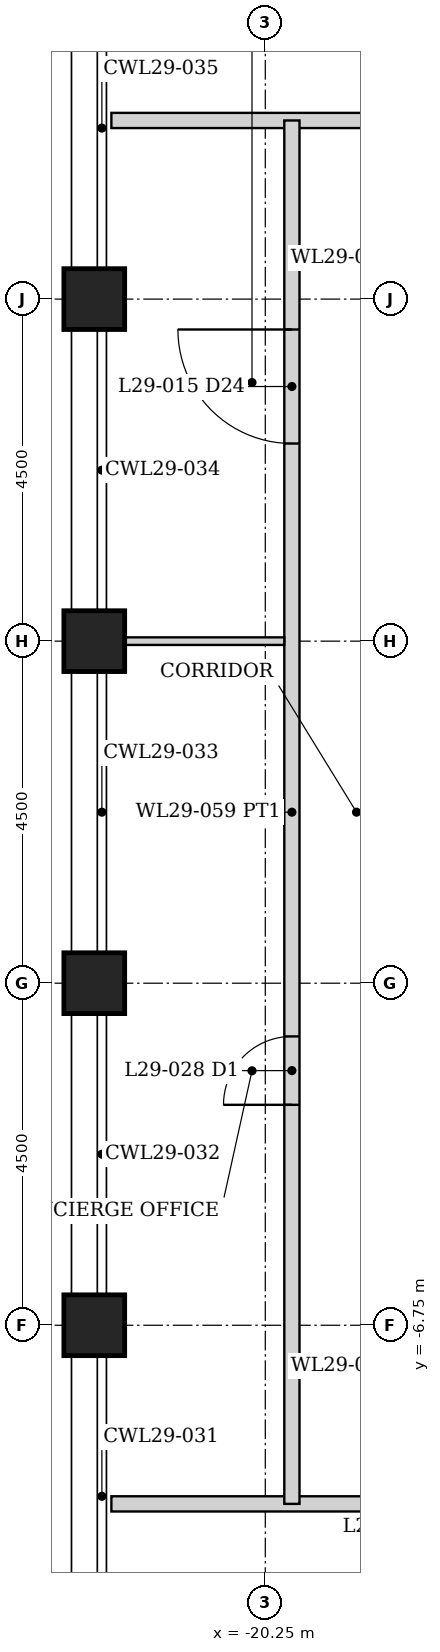
"""IFC4 building model, lengths in metres.
Left out: names, types, materials, properties, quantities, classifications, styles, units other than length and angle.
Written with IfcOpenShell. Run it as: python <this file> out.ifc"""

import sys

from ifc_helpers import new_model, si_unit, direction, frame, frame_2d, origin, origin_2d, place, context, subcontext, project, spatial, rectangle, hollow_rectangle, extrude, element, fill, save


model = new_model("IFC4")
c1 = context("Model", 3, precision=1e-05, world=origin(), true_north=direction((0.0, 1.0)))
c2 = subcontext(c1, "Body", "Model", "MODEL_VIEW")
j1 = project(units=[si_unit("LENGTHUNIT", "METRE"), si_unit("PLANEANGLEUNIT", "RADIAN")], contexts=[c1])
p1 = place(None, origin())
s1 = spatial("IfcSite", under=j1, at=p1, CompositionType="ELEMENT")
p2 = place(p1, origin())
s2 = spatial("IfcBuilding", under=s1, at=p2, CompositionType="ELEMENT")
p3 = place(p2, frame((0.0, 0.0, 112.4)))
s3 = spatial("IfcBuildingStorey", under=s2, at=p3, CompositionType="ELEMENT", Elevation=112.4)
for number, where, z_axis, x_axis in (
    (1, (-22.5, -6.75, 0.0), (0.0, 0.0, 1.0), (1.0, 0.0, 0.0)),
    (2, (-22.5, -2.25, 0.0), (0.0, 0.0, 1.0), (1.0, 0.0, 0.0)),
    (3, (-22.5, 2.25, 0.0), (0.0, 0.0, 1.0), (1.0, 0.0, 0.0)),
    (4, (-22.5, 6.75, 0.0), (0.0, 0.0, 1.0), (1.0, 0.0, 0.0)),
):
    element("IfcColumn", number, at=place(p3, frame(where, z_axis=z_axis, x_axis=x_axis)), inside=s3, PredefinedType="COLUMN", context=c2, shape_type="SweptSolid", body=[
        extrude(hollow_rectangle(XDim=0.8, YDim=0.8, WallThickness=0.06, at=origin_2d()), origin(), (0.0, 0.0, 1.0), 6.0),
    ])
p4 = place(p3, frame((-22.275, 9.1, 0.0), z_axis=(0.0, 0.0, 1.0), x_axis=(1.0, 0.0, 0.0)))
e5 = element("IfcWall", 5, at=p4, inside=s3, PredefinedType="PARTITIONING", context=c2, shape_type="SweptSolid", body=[
    extrude(rectangle(XDim=44.55, YDim=0.2, at=frame_2d((22.275, 0.0))), origin(), (0.0, 0.0, 1.0), 4.874),
])
p5 = place(p4, frame((4.065, 0.0, 0.0)))
e6 = element("IfcOpeningElement", 6, at=p5, cuts=e5, PredefinedType="OPENING", context=c2, shape_type="SweptSolid", body=[
    extrude(rectangle(XDim=0.9, YDim=2.1, at=frame_2d((0.45, 1.05))), frame((0.0, 0.11, 0.0), z_axis=(0.0, -1.0, 0.0), x_axis=(1.0, 0.0, 0.0)), (0.0, 0.0, 1.0), 0.22),
])
p6 = place(p4, frame((9.625, 0.0, 0.0)))
e7 = element("IfcOpeningElement", 7, at=p6, cuts=e5, PredefinedType="OPENING", context=c2, shape_type="SweptSolid", body=[
    extrude(rectangle(XDim=0.8, YDim=2.1, at=frame_2d((0.4, 1.05))), frame((0.0, 0.11, 0.0), z_axis=(0.0, -1.0, 0.0), x_axis=(1.0, 0.0, 0.0)), (0.0, 0.0, 1.0), 0.22),
])
p7 = place(p4, frame((12.8, 0.0, 0.0)))
e8 = element("IfcOpeningElement", 8, at=p7, cuts=e5, PredefinedType="OPENING", context=c2, shape_type="SweptSolid", body=[
    extrude(rectangle(XDim=1.2, YDim=2.1, at=frame_2d((0.6, 1.05))), frame((0.0, 0.11, 0.0), z_axis=(0.0, -1.0, 0.0), x_axis=(1.0, 0.0, 0.0)), (0.0, 0.0, 1.0), 0.22),
])
p8 = place(p4, frame((21.825, 0.0, 0.0)))
e9 = element("IfcOpeningElement", 9, at=p8, cuts=e5, PredefinedType="OPENING", context=c2, shape_type="SweptSolid", body=[
    extrude(rectangle(XDim=0.9, YDim=2.1, at=frame_2d((0.45, 1.05))), frame((0.0, 0.11, 0.0), z_axis=(0.0, -1.0, 0.0), x_axis=(1.0, 0.0, 0.0)), (0.0, 0.0, 1.0), 0.22),
])
p9 = place(p4, frame((16.9, 0.0, 0.0)))
e10 = element("IfcOpeningElement", 10, at=p9, cuts=e5, PredefinedType="OPENING", context=c2, shape_type="SweptSolid", body=[
    extrude(rectangle(XDim=1.0, YDim=2.1, at=frame_2d((0.5, 1.05))), frame((0.0, 0.11, 0.0), z_axis=(0.0, -1.0, 0.0), x_axis=(1.0, 0.0, 0.0)), (0.0, 0.0, 1.0), 0.22),
])
p10 = place(p4, frame((26.65, 0.0, 0.0)))
e11 = element("IfcOpeningElement", 11, at=p10, cuts=e5, PredefinedType="OPENING", context=c2, shape_type="SweptSolid", body=[
    extrude(rectangle(XDim=1.0, YDim=2.1, at=frame_2d((0.5, 1.05))), frame((0.0, 0.11, 0.0), z_axis=(0.0, -1.0, 0.0), x_axis=(1.0, 0.0, 0.0)), (0.0, 0.0, 1.0), 0.22),
])
p11 = place(p4, frame((40.436, 0.0, 0.0)))
e12 = element("IfcOpeningElement", 12, at=p11, cuts=e5, PredefinedType="OPENING", context=c2, shape_type="SweptSolid", body=[
    extrude(rectangle(XDim=0.9, YDim=2.1, at=frame_2d((0.45, 1.05))), frame((0.0, 0.11, 0.0), z_axis=(0.0, -1.0, 0.0), x_axis=(1.0, 0.0, 0.0)), (0.0, 0.0, 1.0), 0.22),
])
p12 = place(p4, frame((32.15, 0.0, 0.0)))
e13 = element("IfcOpeningElement", 13, at=p12, cuts=e5, PredefinedType="OPENING", context=c2, shape_type="SweptSolid", body=[
    extrude(rectangle(XDim=1.5, YDim=2.1, at=frame_2d((0.75, 1.05))), frame((0.0, 0.11, 0.0), z_axis=(0.0, -1.0, 0.0), x_axis=(1.0, 0.0, 0.0)), (0.0, 0.0, 1.0), 0.22),
])
p13 = place(p4, frame((37.775, 0.0, 0.0)))
e14 = element("IfcOpeningElement", 14, at=p13, cuts=e5, PredefinedType="OPENING", context=c2, shape_type="SweptSolid", body=[
    extrude(rectangle(XDim=1.0, YDim=2.1, at=frame_2d((0.5, 1.05))), frame((0.0, 0.11, 0.0), z_axis=(0.0, -1.0, 0.0), x_axis=(1.0, 0.0, 0.0)), (0.0, 0.0, 1.0), 0.22),
])
p14 = place(p3, frame((-22.275, -9.1, 0.0), z_axis=(0.0, 0.0, 1.0), x_axis=(1.0, 0.0, 0.0)))
e15 = element("IfcWall", 15, at=p14, inside=s3, PredefinedType="PARTITIONING", context=c2, shape_type="SweptSolid", body=[
    extrude(rectangle(XDim=44.55, YDim=0.2, at=frame_2d((22.275, 0.0))), origin(), (0.0, 0.0, 1.0), 4.874),
])
p15 = place(p14, frame((3.348, 0.0, 0.0)))
e16 = element("IfcOpeningElement", 16, at=p15, cuts=e15, PredefinedType="OPENING", context=c2, shape_type="SweptSolid", body=[
    extrude(rectangle(XDim=0.9, YDim=2.1, at=frame_2d((0.45, 1.05))), frame((0.0, 0.11, 0.0), z_axis=(0.0, -1.0, 0.0), x_axis=(1.0, 0.0, 0.0)), (0.0, 0.0, 1.0), 0.22),
])
p16 = place(p14, frame((9.525, 0.0, 0.0)))
e17 = element("IfcOpeningElement", 17, at=p16, cuts=e15, PredefinedType="OPENING", context=c2, shape_type="SweptSolid", body=[
    extrude(rectangle(XDim=1.0, YDim=2.1, at=frame_2d((0.5, 1.05))), frame((0.0, 0.11, 0.0), z_axis=(0.0, -1.0, 0.0), x_axis=(1.0, 0.0, 0.0)), (0.0, 0.0, 1.0), 0.22),
])
p17 = place(p14, frame((13.75, 0.0, 0.0)))
e18 = element("IfcOpeningElement", 18, at=p17, cuts=e15, PredefinedType="OPENING", context=c2, shape_type="SweptSolid", body=[
    extrude(rectangle(XDim=0.8, YDim=2.1, at=frame_2d((0.4, 1.05))), frame((0.0, 0.11, 0.0), z_axis=(0.0, -1.0, 0.0), x_axis=(1.0, 0.0, 0.0)), (0.0, 0.0, 1.0), 0.22),
])
p18 = place(p14, frame((20.817, 0.0, 0.0)))
e19 = element("IfcOpeningElement", 19, at=p18, cuts=e15, PredefinedType="OPENING", context=c2, shape_type="SweptSolid", body=[
    extrude(rectangle(XDim=0.9, YDim=2.1, at=frame_2d((0.45, 1.05))), frame((0.0, 0.11, 0.0), z_axis=(0.0, -1.0, 0.0), x_axis=(1.0, 0.0, 0.0)), (0.0, 0.0, 1.0), 0.22),
])
p19 = place(p14, frame((26.3, 0.0, 0.0)))
e20 = element("IfcOpeningElement", 20, at=p19, cuts=e15, PredefinedType="OPENING", context=c2, shape_type="SweptSolid", body=[
    extrude(rectangle(XDim=0.9, YDim=2.1, at=frame_2d((0.45, 1.05))), frame((0.0, 0.11, 0.0), z_axis=(0.0, -1.0, 0.0), x_axis=(1.0, 0.0, 0.0)), (0.0, 0.0, 1.0), 0.22),
])
p20 = place(p14, frame((16.375, 0.0, 0.0)))
e21 = element("IfcOpeningElement", 21, at=p20, cuts=e15, PredefinedType="OPENING", context=c2, shape_type="SweptSolid", body=[
    extrude(rectangle(XDim=0.8, YDim=2.1, at=frame_2d((0.4, 1.05))), frame((0.0, 0.11, 0.0), z_axis=(0.0, -1.0, 0.0), x_axis=(1.0, 0.0, 0.0)), (0.0, 0.0, 1.0), 0.22),
])
p21 = place(p14, frame((39.811, 0.0, 0.0)))
e22 = element("IfcOpeningElement", 22, at=p21, cuts=e15, PredefinedType="OPENING", context=c2, shape_type="SweptSolid", body=[
    extrude(rectangle(XDim=0.9, YDim=2.1, at=frame_2d((0.45, 1.05))), frame((0.0, 0.11, 0.0), z_axis=(0.0, -1.0, 0.0), x_axis=(1.0, 0.0, 0.0)), (0.0, 0.0, 1.0), 0.22),
])
p22 = place(p14, frame((30.65, 0.0, 0.0)))
e23 = element("IfcOpeningElement", 23, at=p22, cuts=e15, PredefinedType="OPENING", context=c2, shape_type="SweptSolid", body=[
    extrude(rectangle(XDim=1.0, YDim=2.1, at=frame_2d((0.5, 1.05))), frame((0.0, 0.11, 0.0), z_axis=(0.0, -1.0, 0.0), x_axis=(1.0, 0.0, 0.0)), (0.0, 0.0, 1.0), 0.22),
])
p23 = place(p14, frame((34.275, 0.0, 0.0)))
e24 = element("IfcOpeningElement", 24, at=p23, cuts=e15, PredefinedType="OPENING", context=c2, shape_type="SweptSolid", body=[
    extrude(rectangle(XDim=1.0, YDim=2.1, at=frame_2d((0.5, 1.05))), frame((0.0, 0.11, 0.0), z_axis=(0.0, -1.0, 0.0), x_axis=(1.0, 0.0, 0.0)), (0.0, 0.0, 1.0), 0.22),
])
p24 = place(p3, frame((-19.9, -9.1, 0.0), z_axis=(0.0, 0.0, 1.0), x_axis=(0.0, 1.0, 0.0)))
e25 = element("IfcWall", 25, at=p24, inside=s3, PredefinedType="PARTITIONING", context=c2, shape_type="SweptSolid", body=[
    extrude(rectangle(XDim=18.2, YDim=0.2, at=frame_2d((9.1, 0.0))), origin(), (0.0, 0.0, 1.0), 4.874),
])
p25 = place(p24, frame((13.95, 0.0, 0.0)))
e26 = element("IfcOpeningElement", 26, at=p25, cuts=e25, PredefinedType="OPENING", context=c2, shape_type="SweptSolid", body=[
    extrude(rectangle(XDim=1.5, YDim=2.4, at=frame_2d((0.75, 1.2))), frame((0.0, 0.11, 0.0), z_axis=(0.0, -1.0, 0.0), x_axis=(1.0, 0.0, 0.0)), (0.0, 0.0, 1.0), 0.22),
])
p26 = place(p24, frame((5.25, 0.0, 0.0)))
e27 = element("IfcOpeningElement", 27, at=p26, cuts=e25, PredefinedType="OPENING", context=c2, shape_type="SweptSolid", body=[
    extrude(rectangle(XDim=0.9, YDim=2.1, at=frame_2d((0.45, 1.05))), frame((0.0, 0.11, 0.0), z_axis=(0.0, -1.0, 0.0), x_axis=(1.0, 0.0, 0.0)), (0.0, 0.0, 1.0), 0.22),
])
p27 = place(p3, frame((-22.1, 2.25, 0.0), z_axis=(0.0, 0.0, 1.0), x_axis=(1.0, 0.0, 0.0)))
e28 = element("IfcWall", 28, at=p27, inside=s3, PredefinedType="PARTITIONING", context=c2, shape_type="SweptSolid", body=[
    extrude(rectangle(XDim=2.1, YDim=0.1, at=frame_2d((1.05, 0.0))), origin(), (0.0, 0.0, 1.0), 4.874),
])
p28 = place(p25, origin())
e29 = element("IfcDoor", 29, at=p28, inside=s3, OperationType="SINGLE_SWING_RIGHT", PredefinedType="DOOR", context=c2, shape_type="SweptSolid", body=[
    extrude(rectangle(XDim=1.5, YDim=2.4, at=frame_2d((0.75, 1.2))), frame((0.0, 0.025, 0.0), z_axis=(0.0, -1.0, 0.0), x_axis=(1.0, 0.0, 0.0)), (0.0, 0.0, 1.0), 0.05),
])
fill(e26, e29)
p29 = place(p26, origin())
e30 = element("IfcDoor", 30, at=p29, inside=s3, OperationType="SINGLE_SWING_LEFT", PredefinedType="DOOR", context=c2, shape_type="SweptSolid", body=[
    extrude(rectangle(XDim=0.9, YDim=2.1, at=frame_2d((0.45, 1.05))), frame((0.0, 0.025, 0.0), z_axis=(0.0, -1.0, 0.0), x_axis=(1.0, 0.0, 0.0)), (0.0, 0.0, 1.0), 0.05),
])
fill(e27, e30)
save(model, sys.argv[1])
